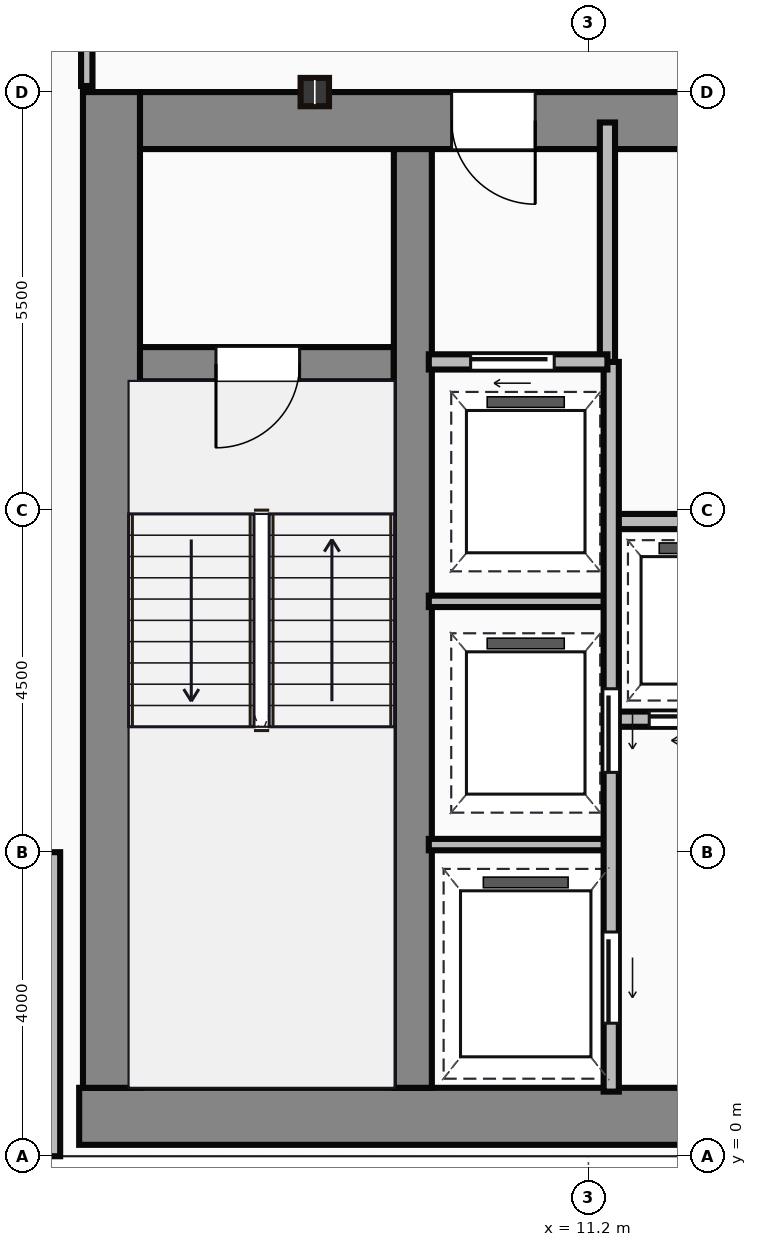
"""IFC4 building model, lengths in metres.
Left out: names, types, materials, properties, quantities, classifications, styles, units other than length and angle.
Written with IfcOpenShell. Run it as: python <this file> out.ifc"""

import sys

from ifc_helpers import new_model, si_unit, direction, frame, frame_2d, origin, origin_2d, place, context, subcontext, project, spatial, rectangle, i_section, extrude, source, transform, mapped, element, fill, save


model = new_model("IFC4")
c1 = context("Model", 3, precision=1e-05, world=origin(), true_north=direction((0.0, 1.0)))
c2 = subcontext(c1, "Body", "Model", "MODEL_VIEW")
j1 = project(units=[si_unit("LENGTHUNIT", "METRE"), si_unit("PLANEANGLEUNIT", "RADIAN")], contexts=[c1])
p1 = place(None, origin())
s1 = spatial("IfcSite", under=j1, at=p1, CompositionType="ELEMENT")
p2 = place(p1, origin())
s2 = spatial("IfcBuilding", under=s1, at=p2, CompositionType="ELEMENT")
p3 = place(p2, frame((0.0, 0.0, 169.8)))
s3 = spatial("IfcBuildingStorey", under=s2, at=p3, CompositionType="ELEMENT", Elevation=169.8)
m1 = source(origin(), c2, "Body", "SweptSolid", [
    extrude(rectangle(XDim=29.5, YDim=0.75, at=frame_2d((14.75, 0.0))), origin(), (0.0, 0.0, 1.0), 3.65),
])
p4 = place(p3, frame((4.5, 0.525, 0.0), z_axis=(0.0, 0.0, 1.0), x_axis=(1.0, 0.0, 0.0)))
e1 = element("IfcWall", 1, at=p4, inside=s3, PredefinedType="SHEAR", context=c2, shape_type="MappedRepresentation", body=[
    mapped(m1, transform((0.0, 0.0, 0.0))),
])
m2 = source(origin(), c2, "Body", "SweptSolid", [
    extrude(rectangle(XDim=13.1, YDim=0.75, at=frame_2d((6.55, 0.0))), origin(), (0.0, 0.0, 1.0), 3.65),
])
p5 = place(p3, frame((4.925, 0.9, 0.0), z_axis=(0.0, 0.0, 1.0), x_axis=(0.0, 1.0, 0.0)))
e2 = element("IfcWall", 2, at=p5, inside=s3, PredefinedType="SHEAR", context=c2, shape_type="MappedRepresentation", body=[
    mapped(m2, transform((0.0, 0.0, 0.0))),
])
m3 = source(origin(), c2, "Body", "SweptSolid", [
    extrude(rectangle(XDim=9.1, YDim=0.75, at=frame_2d((4.55, 0.0))), origin(), (0.0, 0.0, 1.0), 3.65),
])
p6 = place(p3, frame((5.3, 13.625, 0.0), z_axis=(0.0, 0.0, 1.0), x_axis=(1.0, 0.0, 0.0)))
e3 = element("IfcWall", 3, at=p6, inside=s3, PredefinedType="SHEAR", context=c2, shape_type="MappedRepresentation", body=[
    mapped(m3, transform((0.0, 0.0, 0.0))),
])
p7 = place(p6, frame((4.1, 0.0, 0.0)))
e4 = element("IfcOpeningElement", 4, at=p7, cuts=e3, PredefinedType="OPENING", context=c2, shape_type="SweptSolid", body=[
    extrude(rectangle(XDim=1.1, YDim=2.15, at=frame_2d((0.55, 1.075))), frame((0.0, 0.385, 0.0), z_axis=(0.0, -1.0, 0.0), x_axis=(1.0, 0.0, 0.0)), (0.0, 0.0, 1.0), 0.77),
])
m4 = source(origin(), c2, "Body", "SweptSolid", [
    extrude(rectangle(XDim=12.35, YDim=0.5, at=frame_2d((6.175, 0.0))), origin(), (0.0, 0.0, 1.0), 3.65),
])
p8 = place(p3, frame((8.89, 0.9, 0.0), z_axis=(0.0, 0.0, 1.0), x_axis=(0.0, 1.0, 0.0)))
e5 = element("IfcWall", 5, at=p8, inside=s3, PredefinedType="SHEAR", context=c2, shape_type="MappedRepresentation", body=[
    mapped(m4, transform((0.0, 0.0, 0.0))),
])
m5 = source(origin(), c2, "Body", "SweptSolid", [
    extrude(rectangle(XDim=3.39, YDim=0.45, at=frame_2d((1.695, 0.0))), origin(), (0.0, 0.0, 1.0), 3.65),
])
p9 = place(p3, frame((5.25, 10.42, 0.0), z_axis=(0.0, 0.0, 1.0), x_axis=(1.0, 0.0, 0.0)))
e6 = element("IfcWall", 6, at=p9, inside=s3, PredefinedType="SHEAR", context=c2, shape_type="MappedRepresentation", body=[
    mapped(m5, transform((0.0, 0.0, 0.0))),
])
p10 = place(p9, frame((1.05, 0.0, 0.0)))
e7 = element("IfcOpeningElement", 7, at=p10, cuts=e6, PredefinedType="OPENING", context=c2, shape_type="SweptSolid", body=[
    extrude(rectangle(XDim=1.1, YDim=2.15, at=frame_2d((0.55, 1.075))), frame((0.0, 0.235, 0.0), z_axis=(0.0, -1.0, 0.0), x_axis=(1.0, 0.0, 0.0)), (0.0, 0.0, 1.0), 0.47),
])
m6 = source(origin(), c2, "Body", "SweptSolid", [
    extrude(i_section(OverallWidth=0.374, OverallDepth=0.372, WebThickness=0.016, FlangeThickness=0.026, at=origin_2d()), origin(), (0.0, 0.0, 1.0), 3.65),
])
p11 = place(p3, frame((7.6, 14.0, 0.0), z_axis=(0.0, 0.0, 1.0), x_axis=(1.0, 0.0, 0.0)))
e8 = element("IfcColumn", 8, at=p11, inside=s3, PredefinedType="COLUMN", context=c2, shape_type="MappedRepresentation", body=[
    mapped(m6, transform((0.0, 0.0, 0.0))),
])
m7 = source(origin(), c2, "Body", "SweptSolid", [
    extrude(rectangle(XDim=4.0, YDim=0.25, at=frame_2d((2.0, 0.0))), origin(), (0.0, 0.0, 1.0), 3.4),
])
p12 = place(p3, frame((4.125, 4.0, 0.0), z_axis=(0.0, 0.0, 1.0), x_axis=(0.0, -1.0, 0.0)))
e9 = element("IfcWall", 9, at=p12, inside=s3, PredefinedType="STANDARD", context=c2, shape_type="MappedRepresentation", body=[
    mapped(m7, transform((0.0, 0.0, 0.0))),
])
m8 = source(origin(), c2, "Body", "SweptSolid", [
    extrude(rectangle(XDim=3.18, YDim=0.2, at=frame_2d((1.59, 0.0))), origin(), (0.0, 0.0, 1.0), 3.4),
])
p13 = place(p3, frame((11.45, 10.42, 0.0), z_axis=(0.0, 0.0, 1.0), x_axis=(0.0, 1.0, 0.0)))
e10 = element("IfcWall", 10, at=p13, inside=s3, PredefinedType="PARTITIONING", context=c2, shape_type="MappedRepresentation", body=[
    mapped(m8, transform((0.0, 0.0, 0.0))),
])
m9 = source(origin(), c2, "Body", "SweptSolid", [
    extrude(rectangle(XDim=2.35, YDim=0.2, at=frame_2d((1.175, 0.0))), origin(), (0.0, 0.0, 1.0), 3.4),
])
p14 = place(p3, frame((9.1, 10.45, 0.0), z_axis=(0.0, 0.0, 1.0), x_axis=(1.0, 0.0, 0.0)))
e11 = element("IfcWall", 11, at=p14, inside=s3, PredefinedType="PARTITIONING", context=c2, shape_type="MappedRepresentation", body=[
    mapped(m9, transform((0.0, 0.0, 0.0))),
])
p15 = place(p14, frame((0.55, 0.0, 0.0)))
e12 = element("IfcOpeningElement", 12, at=p15, cuts=e11, PredefinedType="OPENING", context=c2, shape_type="SweptSolid", body=[
    extrude(rectangle(XDim=1.1, YDim=2.15, at=frame_2d((0.55, 1.075))), frame((0.0, 0.11, 0.0), z_axis=(0.0, -1.0, 0.0), x_axis=(1.0, 0.0, 0.0)), (0.0, 0.0, 1.0), 0.22),
])
m10 = source(origin(), c2, "Body", "SweptSolid", [
    extrude(rectangle(XDim=9.6, YDim=0.2, at=frame_2d((4.8, 0.0))), origin(), (0.0, 0.0, 1.0), 3.4),
])
p16 = place(p3, frame((11.5, 0.85, 0.0), z_axis=(0.0, 0.0, 1.0), x_axis=(0.0, 1.0, 0.0)))
e13 = element("IfcWall", 13, at=p16, inside=s3, PredefinedType="PARTITIONING", context=c2, shape_type="MappedRepresentation", body=[
    mapped(m10, transform((0.0, 0.0, 0.0))),
])
p17 = place(p16, frame((4.2, 0.0, 0.0)))
e14 = element("IfcOpeningElement", 14, at=p17, cuts=e13, PredefinedType="OPENING", context=c2, shape_type="SweptSolid", body=[
    extrude(rectangle(XDim=1.1, YDim=2.15, at=frame_2d((0.55, 1.075))), frame((0.0, 0.11, 0.0), z_axis=(0.0, -1.0, 0.0), x_axis=(1.0, 0.0, 0.0)), (0.0, 0.0, 1.0), 0.22),
])
p18 = place(p16, frame((0.9, 0.0, 0.0)))
e15 = element("IfcOpeningElement", 15, at=p18, cuts=e13, PredefinedType="OPENING", context=c2, shape_type="SweptSolid", body=[
    extrude(rectangle(XDim=1.2, YDim=2.15, at=frame_2d((0.6, 1.075))), frame((0.0, 0.11, 0.0), z_axis=(0.0, -1.0, 0.0), x_axis=(1.0, 0.0, 0.0)), (0.0, 0.0, 1.0), 0.22),
])
m11 = source(origin(), c2, "Body", "SweptSolid", [
    extrude(rectangle(XDim=2.4, YDim=0.15, at=frame_2d((1.2, 0.0))), origin(), (0.0, 0.0, 1.0), 3.4),
])
for number, where, z_axis, x_axis in (
    (16, (9.1, 4.1, 0.0), (0.0, 0.0, 1.0), (1.0, 0.0, 0.0)),
    (17, (9.1, 7.3, 0.0), (0.0, 0.0, 1.0), (1.0, 0.0, 0.0)),
):
    element("IfcWall", number, at=place(p3, frame(where, z_axis=z_axis, x_axis=x_axis)), inside=s3, PredefinedType="PARTITIONING", context=c2, shape_type="MappedRepresentation", body=[
        mapped(m11, transform((0.0, 0.0, 0.0))),
    ])
m12 = source(origin(), c2, "Body", "SweptSolid", [
    extrude(rectangle(XDim=11.85, YDim=0.2, at=frame_2d((5.925, 0.0))), origin(), (0.0, 0.0, 1.0), 3.4),
])
p19 = place(p3, frame((11.55, 5.75, 0.0), z_axis=(0.0, 0.0, 1.0), x_axis=(1.0, 0.0, 0.0)))
e18 = element("IfcWall", 18, at=p19, inside=s3, PredefinedType="PARTITIONING", context=c2, shape_type="MappedRepresentation", body=[
    mapped(m12, transform((0.0, 0.0, 0.0))),
])
p20 = place(p19, frame((0.45, 0.0, 0.0)))
e19 = element("IfcOpeningElement", 19, at=p20, cuts=e18, PredefinedType="OPENING", context=c2, shape_type="SweptSolid", body=[
    extrude(rectangle(XDim=1.05, YDim=2.15, at=frame_2d((0.525, 1.075))), frame((0.0, 0.11, 0.0), z_axis=(0.0, -1.0, 0.0), x_axis=(1.0, 0.0, 0.0)), (0.0, 0.0, 1.0), 0.22),
])
p21 = place(p19, frame((2.4, 0.0, 0.0)))
e20 = element("IfcOpeningElement", 20, at=p21, cuts=e18, PredefinedType="OPENING", context=c2, shape_type="SweptSolid", body=[
    extrude(rectangle(XDim=1.05, YDim=2.15, at=frame_2d((0.525, 1.075))), frame((0.0, 0.11, 0.0), z_axis=(0.0, -1.0, 0.0), x_axis=(1.0, 0.0, 0.0)), (0.0, 0.0, 1.0), 0.22),
])
p22 = place(p19, frame((4.35, 0.0, 0.0)))
e21 = element("IfcOpeningElement", 21, at=p22, cuts=e18, PredefinedType="OPENING", context=c2, shape_type="SweptSolid", body=[
    extrude(rectangle(XDim=1.05, YDim=2.15, at=frame_2d((0.525, 1.075))), frame((0.0, 0.11, 0.0), z_axis=(0.0, -1.0, 0.0), x_axis=(1.0, 0.0, 0.0)), (0.0, 0.0, 1.0), 0.22),
])
p23 = place(p19, frame((6.3, 0.0, 0.0)))
e22 = element("IfcOpeningElement", 22, at=p23, cuts=e18, PredefinedType="OPENING", context=c2, shape_type="SweptSolid", body=[
    extrude(rectangle(XDim=1.05, YDim=2.15, at=frame_2d((0.525, 1.075))), frame((0.0, 0.11, 0.0), z_axis=(0.0, -1.0, 0.0), x_axis=(1.0, 0.0, 0.0)), (0.0, 0.0, 1.0), 0.22),
])
p24 = place(p19, frame((8.25, 0.0, 0.0)))
e23 = element("IfcOpeningElement", 23, at=p24, cuts=e18, PredefinedType="OPENING", context=c2, shape_type="SweptSolid", body=[
    extrude(rectangle(XDim=1.05, YDim=2.15, at=frame_2d((0.525, 1.075))), frame((0.0, 0.11, 0.0), z_axis=(0.0, -1.0, 0.0), x_axis=(1.0, 0.0, 0.0)), (0.0, 0.0, 1.0), 0.22),
])
p25 = place(p19, frame((10.2, 0.0, 0.0)))
e24 = element("IfcOpeningElement", 24, at=p25, cuts=e18, PredefinedType="OPENING", context=c2, shape_type="SweptSolid", body=[
    extrude(rectangle(XDim=1.05, YDim=2.15, at=frame_2d((0.525, 1.075))), frame((0.0, 0.11, 0.0), z_axis=(0.0, -1.0, 0.0), x_axis=(1.0, 0.0, 0.0)), (0.0, 0.0, 1.0), 0.22),
])
p26 = place(p3, frame((11.55, 8.35, 0.0), z_axis=(0.0, 0.0, 1.0), x_axis=(1.0, 0.0, 0.0)))
e25 = element("IfcWall", 25, at=p26, inside=s3, PredefinedType="PARTITIONING", context=c2, shape_type="MappedRepresentation", body=[
    mapped(m12, transform((0.0, 0.0, 0.0))),
])
m13 = source(origin(), c2, "Body", "SweptSolid", [
    extrude(rectangle(XDim=2.22, YDim=0.15, at=frame_2d((1.11, 0.0))), origin(), (0.0, 0.0, 1.0), 3.4),
])
p27 = place(p3, frame((4.6, 14.08, 0.0), z_axis=(0.0, 0.0, 1.0), x_axis=(0.0, 1.0, 0.0)))
e26 = element("IfcWall", 26, at=p27, inside=s3, PredefinedType="PARTITIONING", context=c2, shape_type="MappedRepresentation", body=[
    mapped(m13, transform((0.0, 0.0, 0.0))),
])
m14 = source(origin(), c2, "Body", "SweptSolid", [
    extrude(rectangle(XDim=1.1, YDim=2.15, at=frame_2d((0.55, 1.075))), frame((0.0, 0.025, 0.0), z_axis=(0.0, -1.0, 0.0), x_axis=(1.0, 0.0, 0.0)), (0.0, 0.0, 1.0), 0.05),
])
p28 = place(p10, frame((1.1, 0.0, 0.0), z_axis=(0.0, 0.0, 1.0), x_axis=(-1.0, 0.0, 0.0)))
e27 = element("IfcDoor", 27, at=p28, inside=s3, OperationType="SINGLE_SWING_LEFT", PredefinedType="DOOR", context=c2, shape_type="MappedRepresentation", body=[
    mapped(m14, transform((0.0, 0.0, 0.0))),
])
fill(e7, e27)
p29 = place(p7, origin())
e28 = element("IfcDoor", 28, at=p29, inside=s3, OperationType="SINGLE_SWING_RIGHT", PredefinedType="DOOR", context=c2, shape_type="MappedRepresentation", body=[
    mapped(m14, transform((0.0, 0.0, 0.0))),
])
fill(e4, e28)
p30 = place(p15, origin())
e29 = element("IfcDoor", 29, at=p30, inside=s3, OperationType="SLIDING_TO_LEFT", PredefinedType="DOOR", context=c2, shape_type="MappedRepresentation", body=[
    mapped(m14, transform((0.0, 0.0, 0.0))),
])
fill(e12, e29)
p31 = place(p17, frame((1.1, 0.0, 0.0), z_axis=(0.0, 0.0, 1.0), x_axis=(-1.0, 0.0, 0.0)))
e30 = element("IfcDoor", 30, at=p31, inside=s3, OperationType="SLIDING_TO_LEFT", PredefinedType="DOOR", context=c2, shape_type="MappedRepresentation", body=[
    mapped(m14, transform((0.0, 0.0, 0.0))),
])
fill(e14, e30)
m15 = source(origin(), c2, "Body", "SweptSolid", [
    extrude(rectangle(XDim=1.2, YDim=2.15, at=frame_2d((0.6, 1.075))), frame((0.0, 0.025, 0.0), z_axis=(0.0, -1.0, 0.0), x_axis=(1.0, 0.0, 0.0)), (0.0, 0.0, 1.0), 0.05),
])
p32 = place(p18, frame((1.2, 0.0, 0.0), z_axis=(0.0, 0.0, 1.0), x_axis=(-1.0, 0.0, 0.0)))
e31 = element("IfcDoor", 31, at=p32, inside=s3, OperationType="SLIDING_TO_LEFT", PredefinedType="DOOR", context=c2, shape_type="MappedRepresentation", body=[
    mapped(m15, transform((0.0, 0.0, 0.0))),
])
fill(e15, e31)
m16 = source(origin(), c2, "Body", "SweptSolid", [
    extrude(rectangle(XDim=1.05, YDim=2.15, at=frame_2d((0.525, 1.075))), frame((0.0, 0.025, 0.0), z_axis=(0.0, -1.0, 0.0), x_axis=(1.0, 0.0, 0.0)), (0.0, 0.0, 1.0), 0.05),
])
p33 = place(p20, frame((1.05, 0.0, 0.0), z_axis=(0.0, 0.0, 1.0), x_axis=(-1.0, 0.0, 0.0)))
e32 = element("IfcDoor", 32, at=p33, inside=s3, OperationType="SLIDING_TO_LEFT", PredefinedType="DOOR", context=c2, shape_type="MappedRepresentation", body=[
    mapped(m16, transform((0.0, 0.0, 0.0))),
])
fill(e19, e32)
save(model, sys.argv[1])
